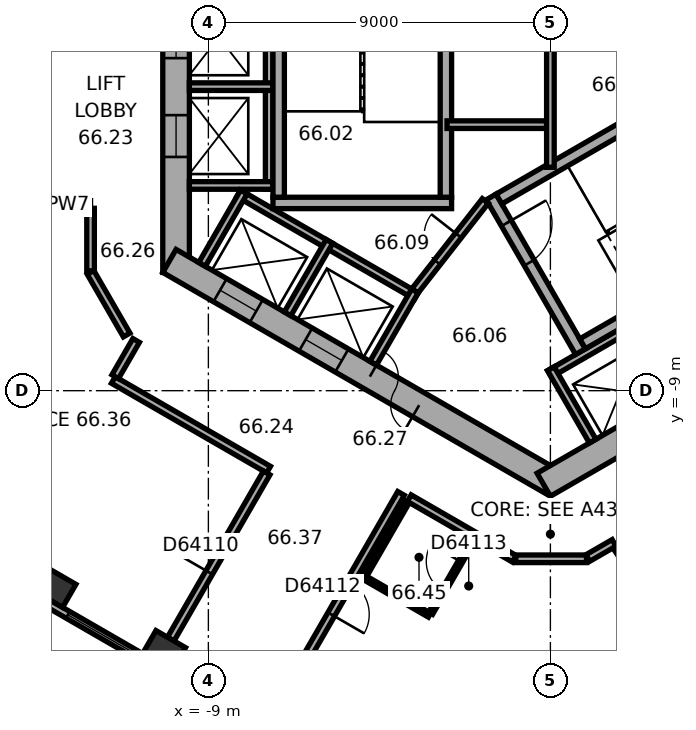
"""IFC4 building model, lengths in metres.
Left out: names, types, materials, properties, quantities, classifications, styles, units other than length and angle.
Written with IfcOpenShell. Run it as: python <this file> out.ifc"""

import sys

from ifc_helpers import new_model, si_unit, direction, frame, frame_2d, origin, origin_2d, place, context, subcontext, project, spatial, rectangle, extrude, element, fill, save


model = new_model("IFC4")
c1 = context("Model", 3, precision=1e-05, world=origin(), true_north=direction((0.0, 1.0)))
c2 = subcontext(c1, "Body", "Model", "MODEL_VIEW")
j1 = project(units=[si_unit("LENGTHUNIT", "METRE"), si_unit("PLANEANGLEUNIT", "RADIAN")], contexts=[c1])
p1 = place(None, origin())
s1 = spatial("IfcSite", under=j1, at=p1, CompositionType="ELEMENT")
p2 = place(p1, origin())
s2 = spatial("IfcBuilding", under=s1, at=p2, CompositionType="ELEMENT")
p3 = place(p2, frame((0.0, 0.0, 267.2)))
s3 = spatial("IfcBuildingStorey", under=s2, at=p3, CompositionType="ELEMENT", Elevation=267.2)
for number, where, z_axis, x_axis in (
    (1, (-13.05, -14.174, 0.0), (0.0, 0.0, 1.0), (0.866, -0.5, 0.0)),
    (2, (-10.165, -15.84, 0.0), (0.0, 0.0, 1.0), (0.866, -0.5, 0.0)),
):
    element("IfcColumn", number, at=place(p3, frame(where, z_axis=z_axis, x_axis=x_axis)), inside=s3, PredefinedType="COLUMN", context=c2, shape_type="SweptSolid", body=[
        extrude(rectangle(XDim=0.9, YDim=0.7, at=origin_2d()), origin(), (0.0, 0.0, 1.0), 3.7),
    ])
p4 = place(p3, frame((-9.85, 5.889, 0.0), z_axis=(0.0, 0.0, 1.0), x_axis=(0.0, -1.0, 0.0)))
e3 = element("IfcWall", 3, at=p4, inside=s3, PredefinedType="SHEAR", context=c2, shape_type="SweptSolid", body=[
    extrude(rectangle(XDim=11.778, YDim=0.7, at=frame_2d((5.889, 0.0))), origin(), (0.0, 0.0, 1.0), 3.7),
])
p5 = place(p4, frame((5.039, 0.0, 0.0)))
e4 = element("IfcOpeningElement", 4, at=p5, cuts=e3, PredefinedType="OPENING", context=c2, shape_type="SweptSolid", body=[
    extrude(rectangle(XDim=1.1, YDim=2.1, at=frame_2d((0.55, 1.05))), frame((0.0, 0.36, 0.0), z_axis=(0.0, -1.0, 0.0), x_axis=(1.0, 0.0, 0.0)), (0.0, 0.0, 1.0), 0.72),
])
p6 = place(p4, frame((7.639, 0.0, 0.0)))
e5 = element("IfcOpeningElement", 5, at=p6, cuts=e3, PredefinedType="OPENING", context=c2, shape_type="SweptSolid", body=[
    extrude(rectangle(XDim=1.1, YDim=2.1, at=frame_2d((0.55, 1.05))), frame((0.0, 0.36, 0.0), z_axis=(0.0, -1.0, 0.0), x_axis=(1.0, 0.0, 0.0)), (0.0, 0.0, 1.0), 0.72),
])
p7 = place(p3, frame((-10.025, -5.586, 0.0), z_axis=(0.0, 0.0, 1.0), x_axis=(0.866026453023, -0.499998182661, 0.0)))
e6 = element("IfcWall", 6, at=p7, inside=s3, PredefinedType="SHEAR", context=c2, shape_type="SweptSolid", body=[
    extrude(rectangle(XDim=11.778, YDim=0.7, at=frame_2d((5.889, 0.0))), origin(), (0.0, 0.0, 1.0), 3.7),
])
p8 = place(p7, frame((6.089, 0.0, 0.0)))
e7 = element("IfcOpeningElement", 7, at=p8, cuts=e6, PredefinedType="OPENING", context=c2, shape_type="SweptSolid", body=[
    extrude(rectangle(XDim=1.5, YDim=2.1, at=frame_2d((0.75, 1.05))), frame((0.0, 0.36, 0.0), z_axis=(0.0, -1.0, 0.0), x_axis=(1.0, 0.0, 0.0)), (0.0, 0.0, 1.0), 0.72),
])
p9 = place(p7, frame((1.539, 0.0, 0.0)))
e8 = element("IfcOpeningElement", 8, at=p9, cuts=e6, PredefinedType="OPENING", context=c2, shape_type="SweptSolid", body=[
    extrude(rectangle(XDim=1.1, YDim=2.1, at=frame_2d((0.55, 1.05))), frame((0.0, 0.36, 0.0), z_axis=(0.0, -1.0, 0.0), x_axis=(1.0, 0.0, 0.0)), (0.0, 0.0, 1.0), 0.72),
])
p10 = place(p7, frame((4.139, 0.0, 0.0)))
e9 = element("IfcOpeningElement", 9, at=p10, cuts=e6, PredefinedType="OPENING", context=c2, shape_type="SweptSolid", body=[
    extrude(rectangle(XDim=1.1, YDim=2.1, at=frame_2d((0.55, 1.05))), frame((0.0, 0.36, 0.0), z_axis=(0.0, -1.0, 0.0), x_axis=(1.0, 0.0, 0.0)), (0.0, 0.0, 1.0), 0.72),
])
p11 = place(p3, frame((-0.175, -11.475, 0.0), z_axis=(0.0, 0.0, 1.0), x_axis=(0.866026453023, 0.499998182661, 0.0)))
e10 = element("IfcWall", 10, at=p11, inside=s3, PredefinedType="SHEAR", context=c2, shape_type="SweptSolid", body=[
    extrude(rectangle(XDim=11.778, YDim=0.7, at=frame_2d((5.889, 0.0))), origin(), (0.0, 0.0, 1.0), 3.7),
])
p12 = place(p11, frame((2.439, 0.0, 0.0)))
e11 = element("IfcOpeningElement", 11, at=p12, cuts=e10, PredefinedType="OPENING", context=c2, shape_type="SweptSolid", body=[
    extrude(rectangle(XDim=1.1, YDim=2.1, at=frame_2d((0.55, 1.05))), frame((0.0, 0.36, 0.0), z_axis=(0.0, -1.0, 0.0), x_axis=(1.0, 0.0, 0.0)), (0.0, 0.0, 1.0), 0.72),
])
p13 = place(p11, frame((5.039, 0.0, 0.0)))
e12 = element("IfcOpeningElement", 12, at=p13, cuts=e10, PredefinedType="OPENING", context=c2, shape_type="SweptSolid", body=[
    extrude(rectangle(XDim=1.1, YDim=2.1, at=frame_2d((0.55, 1.05))), frame((0.0, 0.36, 0.0), z_axis=(0.0, -1.0, 0.0), x_axis=(1.0, 0.0, 0.0)), (0.0, 0.0, 1.0), 0.72),
])
p14 = place(p11, frame((7.639, 0.0, 0.0)))
e13 = element("IfcOpeningElement", 13, at=p14, cuts=e10, PredefinedType="OPENING", context=c2, shape_type="SweptSolid", body=[
    extrude(rectangle(XDim=1.1, YDim=2.1, at=frame_2d((0.55, 1.05))), frame((0.0, 0.36, 0.0), z_axis=(0.0, -1.0, 0.0), x_axis=(1.0, 0.0, 0.0)), (0.0, 0.0, 1.0), 0.72),
])
p15 = place(p3, frame((-16.626, -12.629, 0.0), z_axis=(0.0, 0.0, 1.0), x_axis=(0.866026460444, -0.499998169808, 0.0)))
e14 = element("IfcWall", 14, at=p15, inside=s3, PredefinedType="STANDARD", context=c2, shape_type="SweptSolid", body=[
    extrude(rectangle(XDim=17.731, YDim=0.2, at=frame_2d((8.866, 0.0))), origin(), (0.0, 0.0, 1.0), 3.7),
])
p16 = place(p15, frame((1.203, 0.0, 0.9)))
e15 = element("IfcOpeningElement", 15, at=p16, cuts=e14, PredefinedType="OPENING", context=c2, shape_type="SweptSolid", body=[
    extrude(rectangle(XDim=2.0, YDim=2.0, at=frame_2d((1.0, 1.0))), frame((0.0, 0.11, 0.0), z_axis=(0.0, -1.0, 0.0), x_axis=(1.0, 0.0, 0.0)), (0.0, 0.0, 1.0), 0.22),
])
p17 = place(p15, frame((4.535, 0.0, 0.9)))
e16 = element("IfcOpeningElement", 16, at=p17, cuts=e14, PredefinedType="OPENING", context=c2, shape_type="SweptSolid", body=[
    extrude(rectangle(XDim=2.0, YDim=2.0, at=frame_2d((1.0, 1.0))), frame((0.0, 0.11, 0.0), z_axis=(0.0, -1.0, 0.0), x_axis=(1.0, 0.0, 0.0)), (0.0, 0.0, 1.0), 0.22),
])
p18 = place(p15, frame((7.867, 0.0, 0.9)))
e17 = element("IfcOpeningElement", 17, at=p18, cuts=e14, PredefinedType="OPENING", context=c2, shape_type="SweptSolid", body=[
    extrude(rectangle(XDim=2.0, YDim=2.0, at=frame_2d((1.0, 1.0))), frame((0.0, 0.11, 0.0), z_axis=(0.0, -1.0, 0.0), x_axis=(1.0, 0.0, 0.0)), (0.0, 0.0, 1.0), 0.22),
])
p19 = place(p15, frame((11.198, 0.0, 0.9)))
e18 = element("IfcOpeningElement", 18, at=p19, cuts=e14, PredefinedType="OPENING", context=c2, shape_type="SweptSolid", body=[
    extrude(rectangle(XDim=2.0, YDim=2.0, at=frame_2d((1.0, 1.0))), frame((0.0, 0.11, 0.0), z_axis=(0.0, -1.0, 0.0), x_axis=(1.0, 0.0, 0.0)), (0.0, 0.0, 1.0), 0.22),
])
p20 = place(p15, frame((14.53, 0.0, 0.9)))
e19 = element("IfcOpeningElement", 19, at=p20, cuts=e14, PredefinedType="OPENING", context=c2, shape_type="SweptSolid", body=[
    extrude(rectangle(XDim=2.0, YDim=2.0, at=frame_2d((1.0, 1.0))), frame((0.0, 0.11, 0.0), z_axis=(0.0, -1.0, 0.0), x_axis=(1.0, 0.0, 0.0)), (0.0, 0.0, 1.0), 0.22),
])
p21 = place(p3, frame((-7.4, 4.3, 0.0), z_axis=(0.0, 0.0, 1.0), x_axis=(0.0, -1.0, 0.0)))
e20 = element("IfcWall", 20, at=p21, inside=s3, PredefinedType="PARTITIONING", context=c2, shape_type="SweptSolid", body=[
    extrude(rectangle(XDim=8.0, YDim=0.2, at=frame_2d((4.0, 0.0))), origin(), (0.0, 0.0, 1.0), 3.42),
])
for number, where, z_axis, x_axis in (
    (21, (-7.3, -1.0, 0.0), (0.0, 0.0, 1.0), (-1.0, 0.0, 0.0)),
    (22, (-7.3, -3.6, 0.0), (0.0, 0.0, 1.0), (-1.0, 0.0, 0.0)),
):
    element("IfcWall", number, at=place(p3, frame(where, z_axis=z_axis, x_axis=x_axis)), inside=s3, PredefinedType="PARTITIONING", context=c2, shape_type="SweptSolid", body=[
        extrude(rectangle(XDim=2.2, YDim=0.2, at=frame_2d((1.1, 0.0))), origin(), (0.0, 0.0, 1.0), 3.42),
    ])
p22 = place(p3, frame((-8.203, -3.809, 0.0), z_axis=(0.0, 0.0, 1.0), x_axis=(0.866028230842, -0.499995103361, 0.0)))
e23 = element("IfcWall", 23, at=p22, inside=s3, PredefinedType="PARTITIONING", context=c2, shape_type="SweptSolid", body=[
    extrude(rectangle(XDim=5.4, YDim=0.2, at=frame_2d((2.7, 0.0))), origin(), (0.0, 0.0, 1.0), 3.42),
])
for number, where, z_axis, x_axis in (
    (24, (-8.067, -3.772, 0.0), (0.0, 0.0, 1.0), (-0.5, -0.866, 0.0)),
    (25, (-5.815, -5.072, 0.0), (0.0, 0.0, 1.0), (-0.5, -0.866, 0.0)),
):
    element("IfcWall", number, at=place(p3, frame(where, z_axis=z_axis, x_axis=x_axis)), inside=s3, PredefinedType="PARTITIONING", context=c2, shape_type="SweptSolid", body=[
        extrude(rectangle(XDim=2.2, YDim=0.2, at=frame_2d((1.1, 0.0))), origin(), (0.0, 0.0, 1.0), 3.42),
    ])
p23 = place(p3, frame((-3.563, -6.372, 0.0), z_axis=(0.0, 0.0, 1.0), x_axis=(-0.499994660107, -0.866028486751, 0.0)))
e26 = element("IfcWall", 26, at=p23, inside=s3, PredefinedType="PARTITIONING", context=c2, shape_type="SweptSolid", body=[
    extrude(rectangle(XDim=2.2, YDim=0.2, at=frame_2d((1.1, 0.0))), origin(), (0.0, 0.0, 1.0), 3.42),
])
p24 = place(p3, frame((-0.024, -8.559, 0.0), z_axis=(0.0, 0.0, 1.0), x_axis=(0.866026010844, 0.49999894854, 0.0)))
e27 = element("IfcWall", 27, at=p24, inside=s3, PredefinedType="PARTITIONING", context=c2, shape_type="SweptSolid", body=[
    extrude(rectangle(XDim=8.0, YDim=0.2, at=frame_2d((4.0, 0.0))), origin(), (0.0, 0.0, 1.0), 3.42),
])
p25 = place(p3, frame((0.013, -8.422, 0.0), z_axis=(0.0, 0.0, 1.0), x_axis=(0.500077893725, -0.86598042715, 0.0)))
e28 = element("IfcWall", 28, at=p25, inside=s3, PredefinedType="PARTITIONING", context=c2, shape_type="SweptSolid", body=[
    extrude(rectangle(XDim=2.2, YDim=0.2, at=frame_2d((1.1, 0.0))), origin(), (0.0, 0.0, 1.0), 3.42),
])
p26 = place(p3, frame((-2.6, -4.06, 0.0), z_axis=(0.0, 0.0, 1.0), x_axis=(-1.0, 0.0, 0.0)))
e29 = element("IfcWall", 29, at=p26, inside=s3, PredefinedType="SHEAR", context=c2, shape_type="SweptSolid", body=[
    extrude(rectangle(XDim=4.7, YDim=0.3, at=frame_2d((2.35, 0.0))), origin(), (0.0, 0.0, 1.0), 3.42),
])
for number, where, z_axis, x_axis in (
    (30, (-2.75, 3.15, 0.0), (0.0, 0.0, 1.0), (0.0, -1.0, 0.0)),
    (31, (-7.15, 3.15, 0.0), (0.0, 0.0, 1.0), (0.0, -1.0, 0.0)),
):
    element("IfcWall", number, at=place(p3, frame(where, z_axis=z_axis, x_axis=x_axis)), inside=s3, PredefinedType="SHEAR", context=c2, shape_type="SweptSolid", body=[
        extrude(rectangle(XDim=7.06, YDim=0.3, at=frame_2d((3.53, 0.0))), origin(), (0.0, 0.0, 1.0), 3.42),
    ])
p27 = place(p3, frame((-1.558, -3.902, 0.0), z_axis=(0.0, 0.0, 1.0), x_axis=(0.499977259774, -0.866038532462, 0.0)))
e32 = element("IfcWall", 32, at=p27, inside=s3, PredefinedType="SHEAR", context=c2, shape_type="SweptSolid", body=[
    extrude(rectangle(XDim=4.7, YDim=0.3, at=frame_2d((2.35, 0.0))), origin(), (0.0, 0.0, 1.0), 3.42),
])
p28 = place(p27, frame((0.8, 0.0, 0.0)))
e33 = element("IfcOpeningElement", 33, at=p28, cuts=e32, PredefinedType="OPENING", context=c2, shape_type="SweptSolid", body=[
    extrude(rectangle(XDim=1.2, YDim=2.1, at=frame_2d((0.6, 1.05))), frame((0.0, 0.16, 0.0), z_axis=(0.0, -1.0, 0.0), x_axis=(1.0, 0.0, 0.0)), (0.0, 0.0, 1.0), 0.32),
])
for number, where, z_axis, x_axis in (
    (34, (-1.353, -3.957, 0.0), (0.0, 0.0, 1.0), (0.866, 0.5, 0.0)),
    (35, (0.847, -7.767, 0.0), (0.0, 0.0, 1.0), (0.866, 0.5, 0.0)),
):
    element("IfcWall", number, at=place(p3, frame(where, z_axis=z_axis, x_axis=x_axis)), inside=s3, PredefinedType="SHEAR", context=c2, shape_type="SweptSolid", body=[
        extrude(rectangle(XDim=7.06, YDim=0.3, at=frame_2d((3.53, 0.0))), origin(), (0.0, 0.0, 1.0), 3.42),
    ])
p29 = place(p3, frame((-1.712, -4.008, 0.0), z_axis=(0.0, 0.0, 1.0), x_axis=(-0.616549420702, -0.787316208287, 0.0)))
e36 = element("IfcWall", 36, at=p29, inside=s3, PredefinedType="PARTITIONING", context=c2, shape_type="SweptSolid", body=[
    extrude(rectangle(XDim=3.002, YDim=0.2, at=frame_2d((1.501, 0.0))), origin(), (0.0, 0.0, 1.0), 3.42),
])
p30 = place(p29, frame((1.15, 0.0, 0.0)))
e37 = element("IfcOpeningElement", 37, at=p30, cuts=e36, PredefinedType="OPENING", context=c2, shape_type="SweptSolid", body=[
    extrude(rectangle(XDim=0.9, YDim=2.1, at=frame_2d((0.45, 1.05))), frame((0.0, 0.11, 0.0), z_axis=(0.0, -1.0, 0.0), x_axis=(1.0, 0.0, 0.0)), (0.0, 0.0, 1.0), 0.22),
])
p31 = place(p3, frame((-2.72, -2.0, 0.0), z_axis=(0.0, 0.0, 1.0), x_axis=(1.0, 0.0, 0.0)))
e38 = element("IfcWall", 38, at=p31, inside=s3, PredefinedType="PARTITIONING", context=c2, shape_type="SweptSolid", body=[
    extrude(rectangle(XDim=2.62, YDim=0.2, at=frame_2d((1.31, 0.0))), origin(), (0.0, 0.0, 1.0), 3.42),
])
p32 = place(p3, frame((0.0, -3.122, 0.0), z_axis=(0.0, 0.0, 1.0), x_axis=(0.0, 1.0, 0.0)))
e39 = element("IfcWall", 39, at=p32, inside=s3, PredefinedType="PARTITIONING", context=c2, shape_type="SweptSolid", body=[
    extrude(rectangle(XDim=6.245, YDim=0.2, at=frame_2d((3.122, 0.0))), origin(), (0.0, 0.0, 1.0), 3.42),
])
p33 = place(p3, frame((-13.301, -4.101, 0.0), z_axis=(0.0, 0.0, 1.0), x_axis=(1.0, 0.0, 0.0)))
e40 = element("IfcWall", 40, at=p33, inside=s3, PredefinedType="PARTITIONING", context=c2, shape_type="SweptSolid", body=[
    extrude(rectangle(XDim=1.201, YDim=0.2, at=frame_2d((0.601, 0.0))), origin(), (0.0, 0.0, 1.0), 3.42),
])
p34 = place(p3, frame((-12.1, -5.889, 0.0), z_axis=(0.0, 0.0, 1.0), x_axis=(0.500063520245, -0.865988727248, 0.0)))
e41 = element("IfcWall", 41, at=p34, inside=s3, PredefinedType="PARTITIONING", context=c2, shape_type="SweptSolid", body=[
    extrude(rectangle(XDim=1.9, YDim=0.2, at=frame_2d((0.95, 0.0))), origin(), (0.0, 0.0, 1.0), 3.42),
])
p35 = place(p3, frame((-12.1, -4.201, 0.0), z_axis=(0.0, 0.0, 1.0), x_axis=(0.0, -1.0, 0.0)))
e42 = element("IfcWall", 42, at=p35, inside=s3, PredefinedType="PARTITIONING", context=c2, shape_type="SweptSolid", body=[
    extrude(rectangle(XDim=1.648, YDim=0.2, at=frame_2d((0.824, 0.0))), origin(), (0.0, 0.0, 1.0), 3.42),
])
p36 = place(p3, frame((-11.501, -8.719, 0.0), z_axis=(0.0, 0.0, 1.0), x_axis=(0.866024434742, -0.500001678427, 0.0)))
e43 = element("IfcWall", 43, at=p36, inside=s3, PredefinedType="PARTITIONING", context=c2, shape_type="SweptSolid", body=[
    extrude(rectangle(XDim=4.718, YDim=0.2, at=frame_2d((2.359, 0.0))), origin(), (0.0, 0.0, 1.0), 3.42),
])
p37 = place(p3, frame((-10.901, -7.678, 0.0), z_axis=(0.0, 0.0, 1.0), x_axis=(-0.500074377092, -0.865982457891, 0.0)))
e44 = element("IfcWall", 44, at=p37, inside=s3, PredefinedType="PARTITIONING", context=c2, shape_type="SweptSolid", body=[
    extrude(rectangle(XDim=1.101, YDim=0.2, at=frame_2d((0.55, 0.0))), origin(), (0.0, 0.0, 1.0), 3.42),
])
p38 = place(p3, frame((-9.99, -15.537, 0.0), z_axis=(0.0, 0.0, 1.0), x_axis=(0.499966611936, 0.866044679534, 0.0)))
e45 = element("IfcWall", 45, at=p38, inside=s3, PredefinedType="PARTITIONING", context=c2, shape_type="SweptSolid", body=[
    extrude(rectangle(XDim=5.049, YDim=0.2, at=frame_2d((2.524, 0.0))), origin(), (0.0, 0.0, 1.0), 2.87),
])
p39 = place(p38, frame((2.024, 0.0, 0.0)))
e46 = element("IfcOpeningElement", 46, at=p39, cuts=e45, PredefinedType="OPENING", context=c2, shape_type="SweptSolid", body=[
    extrude(rectangle(XDim=1.0, YDim=2.1, at=frame_2d((0.5, 1.05))), frame((0.0, 0.11, 0.0), z_axis=(0.0, -1.0, 0.0), x_axis=(1.0, 0.0, 0.0)), (0.0, 0.0, 1.0), 0.22),
])
p40 = place(p3, frame((-7.105, -17.202, 0.0), z_axis=(0.0, 0.0, 1.0), x_axis=(0.499988692146, 0.866031932279, 0.0)))
e47 = element("IfcWall", 47, at=p40, inside=s3, PredefinedType="PARTITIONING", context=c2, shape_type="SweptSolid", body=[
    extrude(rectangle(XDim=6.35, YDim=0.2, at=frame_2d((3.175, 0.0))), origin(), (0.0, 0.0, 1.0), 3.42),
])
p41 = place(p40, frame((2.675, 0.0, 0.0)))
e48 = element("IfcOpeningElement", 48, at=p41, cuts=e47, PredefinedType="OPENING", context=c2, shape_type="SweptSolid", body=[
    extrude(rectangle(XDim=1.0, YDim=2.1, at=frame_2d((0.5, 1.05))), frame((0.0, 0.11, 0.0), z_axis=(0.0, -1.0, 0.0), x_axis=(1.0, 0.0, 0.0)), (0.0, 0.0, 1.0), 0.22),
])
p42 = place(p3, frame((-4.913, -13.906, 0.0), z_axis=(0.0, 0.0, 1.0), x_axis=(0.500031774688, 0.866007057882, 0.0)))
e49 = element("IfcWall", 49, at=p42, inside=s3, PredefinedType="PARTITIONING", context=c2, shape_type="SweptSolid", body=[
    extrude(rectangle(XDim=2.3, YDim=0.12, at=frame_2d((1.15, 0.0))), origin(), (0.0, 0.0, 1.0), 3.42),
])
p43 = place(p3, frame((-3.713, -11.828, 0.0), z_axis=(0.0, 0.0, 1.0), x_axis=(0.866026321388, -0.499998410661, 0.0)))
e50 = element("IfcWall", 50, at=p43, inside=s3, PredefinedType="PARTITIONING", context=c2, shape_type="SweptSolid", body=[
    extrude(rectangle(XDim=3.191, YDim=0.2, at=frame_2d((1.595, 0.0))), origin(), (0.0, 0.0, 1.0), 3.42),
])
p44 = place(p3, frame((-3.181, -14.906, 0.0), z_axis=(0.0, 0.0, 1.0), x_axis=(-0.866043088465, 0.499969367985, 0.0)))
e51 = element("IfcWall", 51, at=p44, inside=s3, PredefinedType="PARTITIONING", context=c2, shape_type="SweptSolid", body=[
    extrude(rectangle(XDim=1.94, YDim=0.12, at=frame_2d((0.97, 0.0))), origin(), (0.0, 0.0, 1.0), 3.42),
])
p45 = place(p3, frame((-2.031, -12.915, 0.0), z_axis=(0.0, 0.0, 1.0), x_axis=(-0.49994888933, -0.866054910533, 0.0)))
e52 = element("IfcWall", 52, at=p45, inside=s3, PredefinedType="PARTITIONING", context=c2, shape_type="SweptSolid", body=[
    extrude(rectangle(XDim=2.24, YDim=0.12, at=frame_2d((1.12, 0.0))), origin(), (0.0, 0.0, 1.0), 3.42),
])
p46 = place(p45, frame((0.67, 0.0, 0.0)))
e53 = element("IfcOpeningElement", 53, at=p46, cuts=e52, PredefinedType="OPENING", context=c2, shape_type="SweptSolid", body=[
    extrude(rectangle(XDim=0.9, YDim=2.1, at=frame_2d((0.45, 1.05))), frame((0.0, 0.07, 0.0), z_axis=(0.0, -1.0, 0.0), x_axis=(1.0, 0.0, 0.0)), (0.0, 0.0, 1.0), 0.14),
])
p47 = place(p3, frame((-0.91, -13.423, 0.0), z_axis=(0.0, 0.0, 1.0), x_axis=(1.0, 0.0, 0.0)))
e54 = element("IfcWall", 54, at=p47, inside=s3, PredefinedType="PARTITIONING", context=c2, shape_type="SweptSolid", body=[
    extrude(rectangle(XDim=1.86, YDim=0.2, at=frame_2d((0.93, 0.0))), origin(), (0.0, 0.0, 1.0), 3.42),
])
p48 = place(p3, frame((0.985, -13.403, 0.0), z_axis=(0.0, 0.0, 1.0), x_axis=(0.866032814021, 0.499987164874, 0.0)))
e55 = element("IfcWall", 55, at=p48, inside=s3, PredefinedType="PARTITIONING", context=c2, shape_type="SweptSolid", body=[
    extrude(rectangle(XDim=0.798, YDim=0.2, at=frame_2d((0.399, 0.0))), origin(), (0.0, 0.0, 1.0), 3.42),
])
p49 = place(p3, frame((5.364, -18.575, 0.0), z_axis=(0.0, 0.0, 1.0), x_axis=(-0.55195757761, 0.833872191957, 0.0)))
e56 = element("IfcWall", 56, at=p49, inside=s3, PredefinedType="PARTITIONING", context=c2, shape_type="SweptSolid", body=[
    extrude(rectangle(XDim=6.581, YDim=0.2, at=frame_2d((3.291, 0.0))), origin(), (0.0, 0.0, 1.0), 3.42),
])
p50 = place(p17, origin())
e57 = element("IfcWindow", 57, at=p50, inside=s3, PartitioningType="SINGLE_PANEL", PredefinedType="WINDOW", context=c2, shape_type="SweptSolid", body=[
    extrude(rectangle(XDim=2.0, YDim=2.0, at=frame_2d((1.0, 1.0))), frame((0.0, 0.03, 0.0), z_axis=(0.0, -1.0, 0.0), x_axis=(1.0, 0.0, 0.0)), (0.0, 0.0, 1.0), 0.06),
])
fill(e16, e57)
p51 = place(p8, origin())
e58 = element("IfcDoor", 58, at=p51, inside=s3, OperationType="DOUBLE_DOOR_SINGLE_SWING", PredefinedType="DOOR", context=c2, shape_type="SweptSolid", body=[
    extrude(rectangle(XDim=1.5, YDim=2.1, at=frame_2d((0.75, 1.05))), frame((0.0, 0.025, 0.0), z_axis=(0.0, -1.0, 0.0), x_axis=(1.0, 0.0, 0.0)), (0.0, 0.0, 1.0), 0.05),
])
fill(e7, e58)
p52 = place(p28, origin())
e59 = element("IfcDoor", 59, at=p52, inside=s3, OperationType="SINGLE_SWING_RIGHT", PredefinedType="DOOR", context=c2, shape_type="SweptSolid", body=[
    extrude(rectangle(XDim=1.2, YDim=2.1, at=frame_2d((0.6, 1.05))), frame((0.0, 0.025, 0.0), z_axis=(0.0, -1.0, 0.0), x_axis=(1.0, 0.0, 0.0)), (0.0, 0.0, 1.0), 0.05),
])
fill(e33, e59)
p53 = place(p30, origin())
e60 = element("IfcDoor", 60, at=p53, inside=s3, OperationType="SINGLE_SWING_LEFT", PredefinedType="DOOR", context=c2, shape_type="SweptSolid", body=[
    extrude(rectangle(XDim=0.9, YDim=2.1, at=frame_2d((0.45, 1.05))), frame((0.0, 0.025, 0.0), z_axis=(0.0, -1.0, 0.0), x_axis=(1.0, 0.0, 0.0)), (0.0, 0.0, 1.0), 0.05),
])
fill(e37, e60)
p54 = place(p5, origin())
e61 = element("IfcDoor", 61, at=p54, inside=s3, OperationType="DOUBLE_DOOR_SLIDING", PredefinedType="DOOR", context=c2, shape_type="SweptSolid", body=[
    extrude(rectangle(XDim=1.1, YDim=2.1, at=frame_2d((0.55, 1.05))), frame((0.0, 0.025, 0.0), z_axis=(0.0, -1.0, 0.0), x_axis=(1.0, 0.0, 0.0)), (0.0, 0.0, 1.0), 0.05),
])
fill(e4, e61)
p55 = place(p6, origin())
e62 = element("IfcDoor", 62, at=p55, inside=s3, OperationType="DOUBLE_DOOR_SLIDING", PredefinedType="DOOR", context=c2, shape_type="SweptSolid", body=[
    extrude(rectangle(XDim=1.1, YDim=2.1, at=frame_2d((0.55, 1.05))), frame((0.0, 0.025, 0.0), z_axis=(0.0, -1.0, 0.0), x_axis=(1.0, 0.0, 0.0)), (0.0, 0.0, 1.0), 0.05),
])
fill(e5, e62)
p56 = place(p9, origin())
e63 = element("IfcDoor", 63, at=p56, inside=s3, OperationType="DOUBLE_DOOR_SLIDING", PredefinedType="DOOR", context=c2, shape_type="SweptSolid", body=[
    extrude(rectangle(XDim=1.1, YDim=2.1, at=frame_2d((0.55, 1.05))), frame((0.0, 0.025, 0.0), z_axis=(0.0, -1.0, 0.0), x_axis=(1.0, 0.0, 0.0)), (0.0, 0.0, 1.0), 0.05),
])
fill(e8, e63)
p57 = place(p10, origin())
e64 = element("IfcDoor", 64, at=p57, inside=s3, OperationType="DOUBLE_DOOR_SLIDING", PredefinedType="DOOR", context=c2, shape_type="SweptSolid", body=[
    extrude(rectangle(XDim=1.1, YDim=2.1, at=frame_2d((0.55, 1.05))), frame((0.0, 0.025, 0.0), z_axis=(0.0, -1.0, 0.0), x_axis=(1.0, 0.0, 0.0)), (0.0, 0.0, 1.0), 0.05),
])
fill(e9, e64)
p58 = place(p39, origin())
e65 = element("IfcDoor", 65, at=p58, inside=s3, OperationType="SINGLE_SWING_LEFT", PredefinedType="DOOR", context=c2, shape_type="SweptSolid", body=[
    extrude(rectangle(XDim=1.0, YDim=2.1, at=frame_2d((0.5, 1.05))), frame((0.0, 0.025, 0.0), z_axis=(0.0, -1.0, 0.0), x_axis=(1.0, 0.0, 0.0)), (0.0, 0.0, 1.0), 0.05),
])
fill(e46, e65)
p59 = place(p41, origin())
e66 = element("IfcDoor", 66, at=p59, inside=s3, OperationType="SINGLE_SWING_LEFT", PredefinedType="DOOR", context=c2, shape_type="SweptSolid", body=[
    extrude(rectangle(XDim=1.0, YDim=2.1, at=frame_2d((0.5, 1.05))), frame((0.0, 0.025, 0.0), z_axis=(0.0, -1.0, 0.0), x_axis=(1.0, 0.0, 0.0)), (0.0, 0.0, 1.0), 0.05),
])
fill(e48, e66)
p60 = place(p46, origin())
e67 = element("IfcDoor", 67, at=p60, inside=s3, OperationType="SINGLE_SWING_LEFT", PredefinedType="DOOR", context=c2, shape_type="SweptSolid", body=[
    extrude(rectangle(XDim=0.9, YDim=2.1, at=frame_2d((0.45, 1.05))), frame((0.0, 0.025, 0.0), z_axis=(0.0, -1.0, 0.0), x_axis=(1.0, 0.0, 0.0)), (0.0, 0.0, 1.0), 0.05),
])
fill(e53, e67)
save(model, sys.argv[1])
